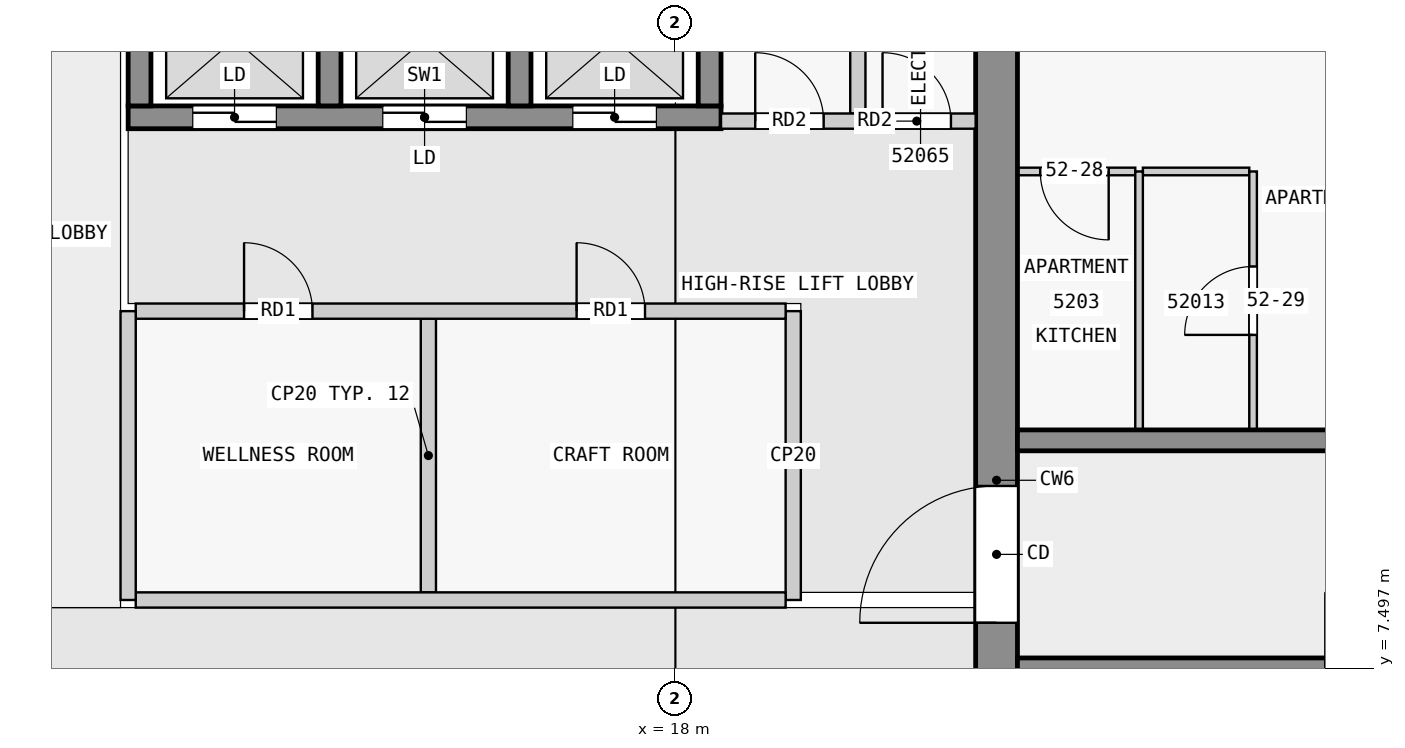
"""IFC4 building model, lengths in metres.
Left out: names, types, materials, properties, quantities, classifications, styles, units other than length and angle.
Written with IfcOpenShell. Run it as: python <this file> out.ifc"""

import sys

from ifc_helpers import new_model, si_unit, direction, frame, frame_2d, origin, place, context, subcontext, project, spatial, rectangle, extrude, element, fill, save


model = new_model("IFC4")
c1 = context("Model", 3, precision=1e-05, world=origin(), true_north=direction((0.0, 1.0)))
c2 = subcontext(c1, "Body", "Model", "MODEL_VIEW")
j1 = project(units=[si_unit("LENGTHUNIT", "METRE"), si_unit("PLANEANGLEUNIT", "RADIAN")], contexts=[c1])
p1 = place(None, origin())
s1 = spatial("IfcSite", under=j1, at=p1, CompositionType="ELEMENT")
p2 = place(p1, origin())
s2 = spatial("IfcBuilding", under=s1, at=p2, CompositionType="ELEMENT")
p3 = place(p2, frame((0.0, 0.0, 201.4)))
s3 = spatial("IfcBuildingStorey", under=s2, at=p3, CompositionType="ELEMENT", Elevation=201.4)
p4 = place(p3, frame((22.225, 2.5, 0.0), z_axis=(0.0, 0.0, 1.0), x_axis=(0.0, 1.0, 0.0)))
e1 = element("IfcWall", 1, at=p4, inside=s3, PredefinedType="SHEAR", context=c2, shape_type="SweptSolid", body=[
    extrude(rectangle(XDim=14.95, YDim=0.55, at=frame_2d((7.475, 0.0))), origin(), (0.0, 0.0, 1.0), 3.25),
])
p5 = place(p4, frame((5.6, 0.0, 0.0)))
e2 = element("IfcOpeningElement", 2, at=p5, cuts=e1, PredefinedType="OPENING", context=c2, shape_type="SweptSolid", body=[
    extrude(rectangle(XDim=1.8, YDim=2.1, at=frame_2d((0.9, 1.05))), frame((0.0, 0.285, 0.0), z_axis=(0.0, -1.0, 0.0), x_axis=(1.0, 0.0, 0.0)), (0.0, 0.0, 1.0), 0.57),
])
p6 = place(p3, frame((10.8, 14.75, 0.0), z_axis=(0.0, 0.0, 1.0), x_axis=(1.0, 0.0, 0.0)))
e3 = element("IfcWall", 3, at=p6, inside=s3, PredefinedType="SHEAR", context=c2, shape_type="SweptSolid", body=[
    extrude(rectangle(XDim=7.8, YDim=0.3, at=frame_2d((3.9, 0.0))), origin(), (0.0, 0.0, 1.0), 3.25),
])
p7 = place(p6, frame((0.85, 0.0, 0.0)))
e4 = element("IfcOpeningElement", 4, at=p7, cuts=e3, PredefinedType="OPENING", context=c2, shape_type="SweptSolid", body=[
    extrude(rectangle(XDim=1.1, YDim=2.1, at=frame_2d((0.55, 1.05))), frame((0.0, 0.16, 0.0), z_axis=(0.0, -1.0, 0.0), x_axis=(1.0, 0.0, 0.0)), (0.0, 0.0, 1.0), 0.32),
])
p8 = place(p6, frame((3.35, 0.0, 0.0)))
e5 = element("IfcOpeningElement", 5, at=p8, cuts=e3, PredefinedType="OPENING", context=c2, shape_type="SweptSolid", body=[
    extrude(rectangle(XDim=1.1, YDim=2.1, at=frame_2d((0.55, 1.05))), frame((0.0, 0.16, 0.0), z_axis=(0.0, -1.0, 0.0), x_axis=(1.0, 0.0, 0.0)), (0.0, 0.0, 1.0), 0.32),
])
p9 = place(p6, frame((5.85, 0.0, 0.0)))
e6 = element("IfcOpeningElement", 6, at=p9, cuts=e3, PredefinedType="OPENING", context=c2, shape_type="SweptSolid", body=[
    extrude(rectangle(XDim=1.1, YDim=2.1, at=frame_2d((0.55, 1.05))), frame((0.0, 0.16, 0.0), z_axis=(0.0, -1.0, 0.0), x_axis=(1.0, 0.0, 0.0)), (0.0, 0.0, 1.0), 0.32),
])
for number, where, z_axis, x_axis in (
    (7, (10.95, 14.9, 0.0), (0.0, 0.0, 1.0), (0.0, 1.0, 0.0)),
    (8, (13.45, 14.9, 0.0), (0.0, 0.0, 1.0), (0.0, 1.0, 0.0)),
    (9, (15.95, 14.9, 0.0), (0.0, 0.0, 1.0), (0.0, 1.0, 0.0)),
    (10, (18.45, 14.9, 0.0), (0.0, 0.0, 1.0), (0.0, 1.0, 0.0)),
):
    element("IfcWall", number, at=place(p3, frame(where, z_axis=z_axis, x_axis=x_axis)), inside=s3, PredefinedType="SHEAR", context=c2, shape_type="SweptSolid", body=[
        extrude(rectangle(XDim=2.0, YDim=0.3, at=frame_2d((1.0, 0.0))), origin(), (0.0, 0.0, 1.0), 3.25),
    ])
p10 = place(p3, frame((22.5, 7.5, 0.0), z_axis=(0.0, 0.0, 1.0), x_axis=(1.0, 0.0, 0.0)))
e11 = element("IfcWall", 11, at=p10, inside=s3, PredefinedType="SHEAR", context=c2, shape_type="SweptSolid", body=[
    extrude(rectangle(XDim=22.5, YDim=0.275, at=frame_2d((11.25, 0.0))), origin(), (0.0, 0.0, 1.0), 3.25),
])
p11 = place(p10, frame((4.05, 0.0, 0.0)))
e12 = element("IfcOpeningElement", 12, at=p11, cuts=e11, PredefinedType="OPENING", context=c2, shape_type="SweptSolid", body=[
    extrude(rectangle(XDim=1.0, YDim=2.1, at=frame_2d((0.5, 1.05))), frame((0.0, 0.147, 0.0), z_axis=(0.0, -1.0, 0.0), x_axis=(1.0, 0.0, 0.0)), (0.0, 0.0, 1.0), 0.295),
])
p12 = place(p10, frame((10.35, 0.0, 0.0)))
e13 = element("IfcOpeningElement", 13, at=p12, cuts=e11, PredefinedType="OPENING", context=c2, shape_type="SweptSolid", body=[
    extrude(rectangle(XDim=1.8, YDim=2.1, at=frame_2d((0.9, 1.05))), frame((0.0, 0.147, 0.0), z_axis=(0.0, -1.0, 0.0), x_axis=(1.0, 0.0, 0.0)), (0.0, 0.0, 1.0), 0.295),
])
p13 = place(p10, frame((16.85, 0.0, 0.0)))
e14 = element("IfcOpeningElement", 14, at=p13, cuts=e11, PredefinedType="OPENING", context=c2, shape_type="SweptSolid", body=[
    extrude(rectangle(XDim=1.0, YDim=2.1, at=frame_2d((0.5, 1.05))), frame((0.0, 0.147, 0.0), z_axis=(0.0, -1.0, 0.0), x_axis=(1.0, 0.0, 0.0)), (0.0, 0.0, 1.0), 0.295),
])
p14 = place(p3, frame((22.5, 10.5, 0.0), z_axis=(0.0, 0.0, 1.0), x_axis=(1.0, 0.0, 0.0)))
e15 = element("IfcWall", 15, at=p14, inside=s3, PredefinedType="SHEAR", context=c2, shape_type="SweptSolid", body=[
    extrude(rectangle(XDim=22.5, YDim=0.275, at=frame_2d((11.25, 0.0))), origin(), (0.0, 0.0, 1.0), 3.25),
])
p15 = place(p14, frame((7.75, 0.0, 0.0)))
e16 = element("IfcOpeningElement", 16, at=p15, cuts=e15, PredefinedType="OPENING", context=c2, shape_type="SweptSolid", body=[
    extrude(rectangle(XDim=1.0, YDim=2.1, at=frame_2d((0.5, 1.05))), frame((0.0, 0.147, 0.0), z_axis=(0.0, -1.0, 0.0), x_axis=(1.0, 0.0, 0.0)), (0.0, 0.0, 1.0), 0.295),
])
p16 = place(p14, frame((18.75, 0.0, 0.0)))
e17 = element("IfcOpeningElement", 17, at=p16, cuts=e15, PredefinedType="OPENING", context=c2, shape_type="SweptSolid", body=[
    extrude(rectangle(XDim=0.9, YDim=2.1, at=frame_2d((0.45, 1.05))), frame((0.0, 0.147, 0.0), z_axis=(0.0, -1.0, 0.0), x_axis=(1.0, 0.0, 0.0)), (0.0, 0.0, 1.0), 0.295),
])
p17 = place(p14, frame((20.95, 0.0, 0.0)))
e18 = element("IfcOpeningElement", 18, at=p17, cuts=e15, PredefinedType="OPENING", context=c2, shape_type="SweptSolid", body=[
    extrude(rectangle(XDim=1.0, YDim=2.1, at=frame_2d((0.5, 1.05))), frame((0.0, 0.147, 0.0), z_axis=(0.0, -1.0, 0.0), x_axis=(1.0, 0.0, 0.0)), (0.0, 0.0, 1.0), 0.295),
])
p18 = place(p3, frame((10.8, 8.4, 0.0), z_axis=(0.0, 0.0, 1.0), x_axis=(0.0, 1.0, 0.0)))
e19 = element("IfcWall", 19, at=p18, inside=s3, PredefinedType="PARTITIONING", context=c2, shape_type="SweptSolid", body=[
    extrude(rectangle(XDim=3.8, YDim=0.2, at=frame_2d((1.9, 0.0))), origin(), (0.0, 0.0, 1.0), 3.25),
])
p19 = place(p3, frame((10.9, 8.4, 0.0), z_axis=(0.0, 0.0, 1.0), x_axis=(1.0, 0.0, 0.0)))
e20 = element("IfcWall", 20, at=p19, inside=s3, PredefinedType="PARTITIONING", context=c2, shape_type="SweptSolid", body=[
    extrude(rectangle(XDim=8.55, YDim=0.2, at=frame_2d((4.275, 0.0))), origin(), (0.0, 0.0, 1.0), 3.25),
])
p20 = place(p3, frame((19.55, 8.4, 0.0), z_axis=(0.0, 0.0, 1.0), x_axis=(0.0, 1.0, 0.0)))
e21 = element("IfcWall", 21, at=p20, inside=s3, PredefinedType="PARTITIONING", context=c2, shape_type="SweptSolid", body=[
    extrude(rectangle(XDim=3.8, YDim=0.2, at=frame_2d((1.9, 0.0))), origin(), (0.0, 0.0, 1.0), 3.25),
])
p21 = place(p3, frame((10.9, 12.2, 0.0), z_axis=(0.0, 0.0, 1.0), x_axis=(1.0, 0.0, 0.0)))
e22 = element("IfcWall", 22, at=p21, inside=s3, PredefinedType="PARTITIONING", context=c2, shape_type="SweptSolid", body=[
    extrude(rectangle(XDim=8.55, YDim=0.2, at=frame_2d((4.275, 0.0))), origin(), (0.0, 0.0, 1.0), 3.25),
])
p22 = place(p21, frame((1.425, 0.0, 0.0)))
e23 = element("IfcOpeningElement", 23, at=p22, cuts=e22, PredefinedType="OPENING", context=c2, shape_type="SweptSolid", body=[
    extrude(rectangle(XDim=0.9, YDim=2.1, at=frame_2d((0.45, 1.05))), frame((0.0, 0.11, 0.0), z_axis=(0.0, -1.0, 0.0), x_axis=(1.0, 0.0, 0.0)), (0.0, 0.0, 1.0), 0.22),
])
p23 = place(p21, frame((5.8, 0.0, 0.0)))
e24 = element("IfcOpeningElement", 24, at=p23, cuts=e22, PredefinedType="OPENING", context=c2, shape_type="SweptSolid", body=[
    extrude(rectangle(XDim=0.9, YDim=2.1, at=frame_2d((0.45, 1.05))), frame((0.0, 0.11, 0.0), z_axis=(0.0, -1.0, 0.0), x_axis=(1.0, 0.0, 0.0)), (0.0, 0.0, 1.0), 0.22),
])
p24 = place(p3, frame((14.75, 8.5, 0.0), z_axis=(0.0, 0.0, 1.0), x_axis=(0.0, 1.0, 0.0)))
e25 = element("IfcWall", 25, at=p24, inside=s3, PredefinedType="PARTITIONING", context=c2, shape_type="SweptSolid", body=[
    extrude(rectangle(XDim=3.6, YDim=0.2, at=frame_2d((1.8, 0.0))), origin(), (0.0, 0.0, 1.0), 3.25),
])
p25 = place(p3, frame((18.6, 14.7, 0.0), z_axis=(0.0, 0.0, 1.0), x_axis=(1.0, 0.0, 0.0)))
e26 = element("IfcWall", 26, at=p25, inside=s3, PredefinedType="PARTITIONING", context=c2, shape_type="SweptSolid", body=[
    extrude(rectangle(XDim=3.35, YDim=0.2, at=frame_2d((1.675, 0.0))), origin(), (0.0, 0.0, 1.0), 3.25),
])
p26 = place(p25, frame((0.45, 0.0, 0.0)))
e27 = element("IfcOpeningElement", 27, at=p26, cuts=e26, PredefinedType="OPENING", context=c2, shape_type="SweptSolid", body=[
    extrude(rectangle(XDim=0.9, YDim=2.1, at=frame_2d((0.45, 1.05))), frame((0.0, 0.11, 0.0), z_axis=(0.0, -1.0, 0.0), x_axis=(1.0, 0.0, 0.0)), (0.0, 0.0, 1.0), 0.22),
])
p27 = place(p25, frame((2.125, 0.0, 0.0)))
e28 = element("IfcOpeningElement", 28, at=p27, cuts=e26, PredefinedType="OPENING", context=c2, shape_type="SweptSolid", body=[
    extrude(rectangle(XDim=0.9, YDim=2.1, at=frame_2d((0.45, 1.05))), frame((0.0, 0.11, 0.0), z_axis=(0.0, -1.0, 0.0), x_axis=(1.0, 0.0, 0.0)), (0.0, 0.0, 1.0), 0.22),
])
p28 = place(p3, frame((20.4, 14.8, 0.0), z_axis=(0.0, 0.0, 1.0), x_axis=(0.0, 1.0, 0.0)))
e29 = element("IfcWall", 29, at=p28, inside=s3, PredefinedType="PARTITIONING", context=c2, shape_type="SweptSolid", body=[
    extrude(rectangle(XDim=2.65, YDim=0.2, at=frame_2d((1.325, 0.0))), origin(), (0.0, 0.0, 1.0), 3.25),
])
p29 = place(p3, frame((24.05, 14.038, 0.0), z_axis=(0.0, 0.0, 1.0), x_axis=(-1.0, 0.0, 0.0)))
e30 = element("IfcWall", 30, at=p29, inside=s3, PredefinedType="PARTITIONING", context=c2, shape_type="SweptSolid", body=[
    extrude(rectangle(XDim=1.55, YDim=0.1, at=frame_2d((0.775, 0.0))), origin(), (0.0, 0.0, 1.0), 3.25),
])
p30 = place(p29, frame((0.35, 0.0, 0.0)))
e31 = element("IfcOpeningElement", 31, at=p30, cuts=e30, PredefinedType="OPENING", context=c2, shape_type="SweptSolid", body=[
    extrude(rectangle(XDim=0.9, YDim=2.1, at=frame_2d((0.45, 1.05))), frame((0.0, 0.06, 0.0), z_axis=(0.0, -1.0, 0.0), x_axis=(1.0, 0.0, 0.0)), (0.0, 0.0, 1.0), 0.12),
])
p31 = place(p3, frame((25.55, 14.038, 0.0), z_axis=(0.0, 0.0, 1.0), x_axis=(-1.0, 0.0, 0.0)))
e32 = element("IfcWall", 32, at=p31, inside=s3, PredefinedType="PARTITIONING", context=c2, shape_type="SweptSolid", body=[
    extrude(rectangle(XDim=1.4, YDim=0.1, at=frame_2d((0.7, 0.0))), origin(), (0.0, 0.0, 1.0), 3.25),
])
p32 = place(p3, frame((24.1, 10.637, 0.0), z_axis=(0.0, 0.0, 1.0), x_axis=(0.0, 1.0, 0.0)))
e33 = element("IfcWall", 33, at=p32, inside=s3, PredefinedType="PARTITIONING", context=c2, shape_type="SweptSolid", body=[
    extrude(rectangle(XDim=3.4, YDim=0.1, at=frame_2d((1.7, 0.0))), origin(), (0.0, 0.0, 1.0), 3.25),
])
p33 = place(p3, frame((25.6, 10.637, 0.0), z_axis=(0.0, 0.0, 1.0), x_axis=(0.0, 1.0, 0.0)))
e34 = element("IfcWall", 34, at=p33, inside=s3, PredefinedType="PARTITIONING", context=c2, shape_type="SweptSolid", body=[
    extrude(rectangle(XDim=3.4, YDim=0.1, at=frame_2d((1.7, 0.0))), origin(), (0.0, 0.0, 1.0), 3.25),
])
p34 = place(p33, frame((1.25, 0.0, 0.0)))
e35 = element("IfcOpeningElement", 35, at=p34, cuts=e34, PredefinedType="OPENING", context=c2, shape_type="SweptSolid", body=[
    extrude(rectangle(XDim=0.9, YDim=2.1, at=frame_2d((0.45, 1.05))), frame((0.0, 0.06, 0.0), z_axis=(0.0, -1.0, 0.0), x_axis=(1.0, 0.0, 0.0)), (0.0, 0.0, 1.0), 0.12),
])
p35 = place(p22, origin())
e36 = element("IfcDoor", 36, at=p35, inside=s3, OperationType="SINGLE_SWING_LEFT", PredefinedType="DOOR", context=c2, shape_type="SweptSolid", body=[
    extrude(rectangle(XDim=0.9, YDim=2.1, at=frame_2d((0.45, 1.05))), frame((0.0, 0.025, 0.0), z_axis=(0.0, -1.0, 0.0), x_axis=(1.0, 0.0, 0.0)), (0.0, 0.0, 1.0), 0.05),
])
fill(e23, e36)
p36 = place(p23, origin())
e37 = element("IfcDoor", 37, at=p36, inside=s3, OperationType="SINGLE_SWING_LEFT", PredefinedType="DOOR", context=c2, shape_type="SweptSolid", body=[
    extrude(rectangle(XDim=0.9, YDim=2.1, at=frame_2d((0.45, 1.05))), frame((0.0, 0.025, 0.0), z_axis=(0.0, -1.0, 0.0), x_axis=(1.0, 0.0, 0.0)), (0.0, 0.0, 1.0), 0.05),
])
fill(e24, e37)
p37 = place(p7, origin())
e38 = element("IfcDoor", 38, at=p37, inside=s3, OperationType="DOUBLE_DOOR_SLIDING", PredefinedType="DOOR", context=c2, shape_type="SweptSolid", body=[
    extrude(rectangle(XDim=1.1, YDim=2.1, at=frame_2d((0.55, 1.05))), frame((0.0, 0.025, 0.0), z_axis=(0.0, -1.0, 0.0), x_axis=(1.0, 0.0, 0.0)), (0.0, 0.0, 1.0), 0.05),
])
fill(e4, e38)
p38 = place(p8, origin())
e39 = element("IfcDoor", 39, at=p38, inside=s3, OperationType="DOUBLE_DOOR_SLIDING", PredefinedType="DOOR", context=c2, shape_type="SweptSolid", body=[
    extrude(rectangle(XDim=1.1, YDim=2.1, at=frame_2d((0.55, 1.05))), frame((0.0, 0.025, 0.0), z_axis=(0.0, -1.0, 0.0), x_axis=(1.0, 0.0, 0.0)), (0.0, 0.0, 1.0), 0.05),
])
fill(e5, e39)
p39 = place(p9, origin())
e40 = element("IfcDoor", 40, at=p39, inside=s3, OperationType="DOUBLE_DOOR_SLIDING", PredefinedType="DOOR", context=c2, shape_type="SweptSolid", body=[
    extrude(rectangle(XDim=1.1, YDim=2.1, at=frame_2d((0.55, 1.05))), frame((0.0, 0.025, 0.0), z_axis=(0.0, -1.0, 0.0), x_axis=(1.0, 0.0, 0.0)), (0.0, 0.0, 1.0), 0.05),
])
fill(e6, e40)
p40 = place(p5, origin())
e41 = element("IfcDoor", 41, at=p40, inside=s3, OperationType="DOUBLE_DOOR_SINGLE_SWING", PredefinedType="DOOR", context=c2, shape_type="SweptSolid", body=[
    extrude(rectangle(XDim=1.8, YDim=2.1, at=frame_2d((0.9, 1.05))), frame((0.0, 0.025, 0.0), z_axis=(0.0, -1.0, 0.0), x_axis=(1.0, 0.0, 0.0)), (0.0, 0.0, 1.0), 0.05),
])
fill(e2, e41)
p41 = place(p26, origin())
e42 = element("IfcDoor", 42, at=p41, inside=s3, OperationType="SINGLE_SWING_LEFT", PredefinedType="DOOR", context=c2, shape_type="SweptSolid", body=[
    extrude(rectangle(XDim=0.9, YDim=2.1, at=frame_2d((0.45, 1.05))), frame((0.0, 0.025, 0.0), z_axis=(0.0, -1.0, 0.0), x_axis=(1.0, 0.0, 0.0)), (0.0, 0.0, 1.0), 0.05),
])
fill(e27, e42)
p42 = place(p27, origin())
e43 = element("IfcDoor", 43, at=p42, inside=s3, OperationType="SINGLE_SWING_LEFT", PredefinedType="DOOR", context=c2, shape_type="SweptSolid", body=[
    extrude(rectangle(XDim=0.9, YDim=2.1, at=frame_2d((0.45, 1.05))), frame((0.0, 0.025, 0.0), z_axis=(0.0, -1.0, 0.0), x_axis=(1.0, 0.0, 0.0)), (0.0, 0.0, 1.0), 0.05),
])
fill(e28, e43)
p43 = place(p30, origin())
e44 = element("IfcDoor", 44, at=p43, inside=s3, OperationType="SINGLE_SWING_RIGHT", PredefinedType="DOOR", context=c2, shape_type="SweptSolid", body=[
    extrude(rectangle(XDim=0.9, YDim=2.1, at=frame_2d((0.45, 1.05))), frame((0.0, 0.025, 0.0), z_axis=(0.0, -1.0, 0.0), x_axis=(1.0, 0.0, 0.0)), (0.0, 0.0, 1.0), 0.05),
])
fill(e31, e44)
p44 = place(p34, origin())
e45 = element("IfcDoor", 45, at=p44, inside=s3, OperationType="SINGLE_SWING_LEFT", PredefinedType="DOOR", context=c2, shape_type="SweptSolid", body=[
    extrude(rectangle(XDim=0.9, YDim=2.1, at=frame_2d((0.45, 1.05))), frame((0.0, 0.025, 0.0), z_axis=(0.0, -1.0, 0.0), x_axis=(1.0, 0.0, 0.0)), (0.0, 0.0, 1.0), 0.05),
])
fill(e35, e45)
save(model, sys.argv[1])
